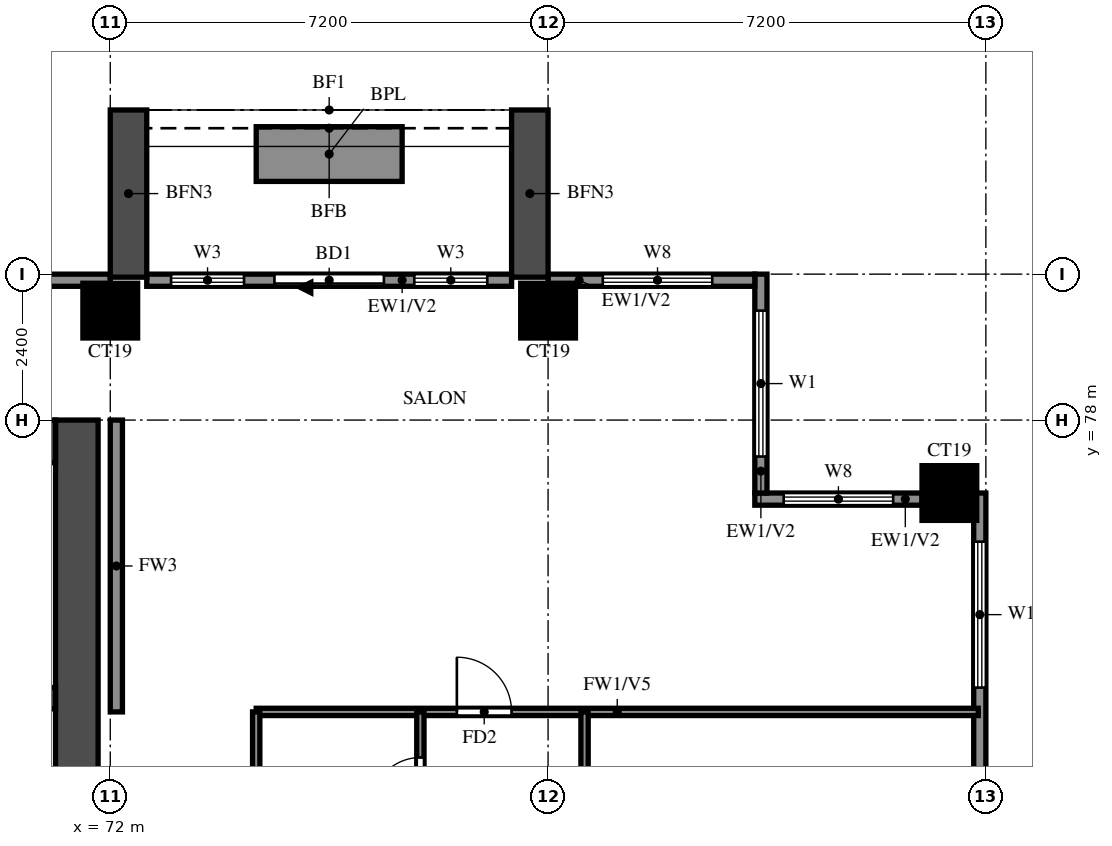
"""IFC4 building model, lengths in metres.
Left out: names, types, materials, properties, quantities, classifications, styles, units other than length and angle.
Written with IfcOpenShell. Run it as: python <this file> out.ifc"""

import sys

from ifc_helpers import new_model, si_unit, direction, frame, frame_2d, origin, origin_2d, place, context, subcontext, project, spatial, rectangle, extrude, source, transform, mapped, element, fill, save


model = new_model("IFC4")
c1 = context("Model", 3, precision=1e-05, world=origin(), true_north=direction((0.0, 1.0)))
c2 = subcontext(c1, "Body", "Model", "MODEL_VIEW")
j1 = project(units=[si_unit("LENGTHUNIT", "METRE"), si_unit("PLANEANGLEUNIT", "RADIAN")], contexts=[c1])
p1 = place(None, origin())
s1 = spatial("IfcSite", under=j1, at=p1, CompositionType="ELEMENT")
p2 = place(p1, origin())
s2 = spatial("IfcBuilding", under=s1, at=p2, CompositionType="ELEMENT")
p3 = place(p2, frame((0.0, 0.0, 116.5)))
s3 = spatial("IfcBuildingStorey", under=s2, at=p3, CompositionType="ELEMENT", Elevation=116.5)
m1 = source(origin(), c2, "Body", "SweptSolid", [
    extrude(rectangle(XDim=0.9, YDim=0.9, at=origin_2d()), origin(), (0.0, 0.0, 1.0), 3.2),
])
for number, where, z_axis, x_axis in (
    (1, (85.8, 76.8, 0.0), (0.0, 0.0, 1.0), (1.0, 0.0, 0.0)),
    (2, (72.0, 79.8, 0.0), (0.0, 0.0, 1.0), (1.0, 0.0, 0.0)),
    (3, (79.2, 79.8, 0.0), (0.0, 0.0, 1.0), (1.0, 0.0, 0.0)),
):
    element("IfcColumn", number, at=place(p3, frame(where, z_axis=z_axis, x_axis=x_axis)), inside=s3, PredefinedType="COLUMN", context=c2, shape_type="MappedRepresentation", body=[
        mapped(m1, transform((0.0, 0.0, 0.0))),
    ])
p4 = place(p3, frame((71.45, 66.1, 0.0), z_axis=(0.0, 0.0, 1.0), x_axis=(0.0, 1.0, 0.0)))
e4 = element("IfcWall", 4, at=p4, inside=s3, PredefinedType="SHEAR", context=c2, shape_type="SweptSolid", body=[
    extrude(rectangle(XDim=11.9, YDim=0.7, at=frame_2d((5.95, 0.0))), origin(), (0.0, 0.0, 1.0), 3.2),
])
p5 = place(p3, frame((29.7, 77.65, 0.0), z_axis=(0.0, 0.0, 1.0), x_axis=(1.0, 0.0, 0.0)))
e5 = element("IfcWall", 5, at=p5, inside=s3, PredefinedType="SHEAR", context=c2, shape_type="SweptSolid", body=[
    extrude(rectangle(XDim=41.4, YDim=0.7, at=frame_2d((20.7, 0.0))), origin(), (0.0, 0.0, 1.0), 3.2),
])
p6 = place(p3, frame((67.975, 73.425, 0.0), z_axis=(0.0, 0.0, 1.0), x_axis=(1.0, 0.0, 0.0)))
e6 = element("IfcWall", 6, at=p6, inside=s3, PredefinedType="SHEAR", context=c2, shape_type="SweptSolid", body=[
    extrude(rectangle(XDim=3.125, YDim=0.35, at=frame_2d((1.562, 0.0))), origin(), (0.0, 0.0, 1.0), 3.2),
])
p7 = place(p3, frame((86.3, 48.2, 0.0), z_axis=(0.0, 0.0, 1.0), x_axis=(0.0, 1.0, 0.0)))
e7 = element("IfcWall", 7, at=p7, inside=s3, PredefinedType="SOLIDWALL", context=c2, shape_type="SweptSolid", body=[
    extrude(rectangle(XDim=28.6, YDim=0.2, at=frame_2d((14.3, 0.0))), origin(), (0.0, 0.0, 1.0), 3.2),
])
p8 = place(p7, frame((0.6, 0.0, 0.6)))
e8 = element("IfcOpeningElement", 8, at=p8, cuts=e7, PredefinedType="OPENING", context=c2, shape_type="SweptSolid", body=[
    extrude(rectangle(XDim=2.4, YDim=2.4, at=frame_2d((1.2, 1.2))), frame((0.0, 0.11, 0.0), z_axis=(0.0, -1.0, 0.0), x_axis=(1.0, 0.0, 0.0)), (0.0, 0.0, 1.0), 0.22),
])
p9 = place(p7, frame((3.8, 0.0, 0.6)))
e9 = element("IfcOpeningElement", 9, at=p9, cuts=e7, PredefinedType="OPENING", context=c2, shape_type="SweptSolid", body=[
    extrude(rectangle(XDim=2.4, YDim=2.4, at=frame_2d((1.2, 1.2))), frame((0.0, 0.11, 0.0), z_axis=(0.0, -1.0, 0.0), x_axis=(1.0, 0.0, 0.0)), (0.0, 0.0, 1.0), 0.22),
])
p10 = place(p7, frame((7.8, 0.0, 0.6)))
e10 = element("IfcOpeningElement", 10, at=p10, cuts=e7, PredefinedType="OPENING", context=c2, shape_type="SweptSolid", body=[
    extrude(rectangle(XDim=2.4, YDim=2.4, at=frame_2d((1.2, 1.2))), frame((0.0, 0.11, 0.0), z_axis=(0.0, -1.0, 0.0), x_axis=(1.0, 0.0, 0.0)), (0.0, 0.0, 1.0), 0.22),
])
p11 = place(p7, frame((11.0, 0.0, 0.6)))
e11 = element("IfcOpeningElement", 11, at=p11, cuts=e7, PredefinedType="OPENING", context=c2, shape_type="SweptSolid", body=[
    extrude(rectangle(XDim=2.4, YDim=2.4, at=frame_2d((1.2, 1.2))), frame((0.0, 0.11, 0.0), z_axis=(0.0, -1.0, 0.0), x_axis=(1.0, 0.0, 0.0)), (0.0, 0.0, 1.0), 0.22),
])
p12 = place(p7, frame((15.167, 0.0, 0.6)))
e12 = element("IfcOpeningElement", 12, at=p12, cuts=e7, PredefinedType="OPENING", context=c2, shape_type="SweptSolid", body=[
    extrude(rectangle(XDim=2.4, YDim=2.4, at=frame_2d((1.2, 1.2))), frame((0.0, 0.11, 0.0), z_axis=(0.0, -1.0, 0.0), x_axis=(1.0, 0.0, 0.0)), (0.0, 0.0, 1.0), 0.22),
])
p13 = place(p7, frame((18.033, 0.0, 0.6)))
e13 = element("IfcOpeningElement", 13, at=p13, cuts=e7, PredefinedType="OPENING", context=c2, shape_type="SweptSolid", body=[
    extrude(rectangle(XDim=2.4, YDim=2.4, at=frame_2d((1.2, 1.2))), frame((0.0, 0.11, 0.0), z_axis=(0.0, -1.0, 0.0), x_axis=(1.0, 0.0, 0.0)), (0.0, 0.0, 1.0), 0.22),
])
p14 = place(p7, frame((22.95, 0.0, 1.5)))
e14 = element("IfcOpeningElement", 14, at=p14, cuts=e7, PredefinedType="OPENING", context=c2, shape_type="SweptSolid", body=[
    extrude(rectangle(XDim=0.9, YDim=0.9, at=frame_2d((0.45, 0.45))), frame((0.0, 0.11, 0.0), z_axis=(0.0, -1.0, 0.0), x_axis=(1.0, 0.0, 0.0)), (0.0, 0.0, 1.0), 0.22),
])
p15 = place(p7, frame((25.4, 0.0, 0.6)))
e15 = element("IfcOpeningElement", 15, at=p15, cuts=e7, PredefinedType="OPENING", context=c2, shape_type="SweptSolid", body=[
    extrude(rectangle(XDim=2.4, YDim=2.4, at=frame_2d((1.2, 1.2))), frame((0.0, 0.11, 0.0), z_axis=(0.0, -1.0, 0.0), x_axis=(1.0, 0.0, 0.0)), (0.0, 0.0, 1.0), 0.22),
])
p16 = place(p3, frame((85.35, 76.7, 0.0), z_axis=(0.0, 0.0, 1.0), x_axis=(-1.0, 0.0, 0.0)))
e16 = element("IfcWall", 16, at=p16, inside=s3, PredefinedType="SOLIDWALL", context=c2, shape_type="SweptSolid", body=[
    extrude(rectangle(XDim=2.75, YDim=0.2, at=frame_2d((1.375, 0.0))), origin(), (0.0, 0.0, 1.0), 3.2),
])
p17 = place(p16, frame((0.475, 0.0, 0.6)))
e17 = element("IfcOpeningElement", 17, at=p17, cuts=e16, PredefinedType="OPENING", context=c2, shape_type="SweptSolid", body=[
    extrude(rectangle(XDim=1.8, YDim=2.4, at=frame_2d((0.9, 1.2))), frame((0.0, 0.11, 0.0), z_axis=(0.0, -1.0, 0.0), x_axis=(1.0, 0.0, 0.0)), (0.0, 0.0, 1.0), 0.22),
])
p18 = place(p3, frame((82.7, 76.8, 0.0), z_axis=(0.0, 0.0, 1.0), x_axis=(0.0, 1.0, 0.0)))
e18 = element("IfcWall", 18, at=p18, inside=s3, PredefinedType="SOLIDWALL", context=c2, shape_type="SweptSolid", body=[
    extrude(rectangle(XDim=3.6, YDim=0.2, at=frame_2d((1.8, 0.0))), origin(), (0.0, 0.0, 1.0), 3.2),
])
p19 = place(p18, frame((0.6, 0.0, 0.6)))
e19 = element("IfcOpeningElement", 19, at=p19, cuts=e18, PredefinedType="OPENING", context=c2, shape_type="SweptSolid", body=[
    extrude(rectangle(XDim=2.4, YDim=2.4, at=frame_2d((1.2, 1.2))), frame((0.0, 0.11, 0.0), z_axis=(0.0, -1.0, 0.0), x_axis=(1.0, 0.0, 0.0)), (0.0, 0.0, 1.0), 0.22),
])
p20 = place(p3, frame((82.6, 80.3, 0.0), z_axis=(0.0, 0.0, 1.0), x_axis=(-1.0, 0.0, 0.0)))
e20 = element("IfcWall", 20, at=p20, inside=s3, PredefinedType="SOLIDWALL", context=c2, shape_type="SweptSolid", body=[
    extrude(rectangle(XDim=3.4, YDim=0.2, at=frame_2d((1.7, 0.0))), origin(), (0.0, 0.0, 1.0), 3.2),
])
p21 = place(p20, frame((0.7, 0.0, 0.6)))
e21 = element("IfcOpeningElement", 21, at=p21, cuts=e20, PredefinedType="OPENING", context=c2, shape_type="SweptSolid", body=[
    extrude(rectangle(XDim=1.8, YDim=2.4, at=frame_2d((0.9, 1.2))), frame((0.0, 0.11, 0.0), z_axis=(0.0, -1.0, 0.0), x_axis=(1.0, 0.0, 0.0)), (0.0, 0.0, 1.0), 0.22),
])
p22 = place(p3, frame((78.6, 80.3, 0.0), z_axis=(0.0, 0.0, 1.0), x_axis=(-1.0, 0.0, 0.0)))
e22 = element("IfcWall", 22, at=p22, inside=s3, PredefinedType="SOLIDWALL", context=c2, shape_type="SweptSolid", body=[
    extrude(rectangle(XDim=6.0, YDim=0.2, at=frame_2d((3.0, 0.0))), origin(), (0.0, 0.0, 1.0), 3.2),
])
p23 = place(p22, frame((2.1, 0.0, 0.0)))
e23 = element("IfcOpeningElement", 23, at=p23, cuts=e22, PredefinedType="OPENING", context=c2, shape_type="SweptSolid", body=[
    extrude(rectangle(XDim=1.8, YDim=2.4, at=frame_2d((0.9, 1.2))), frame((0.0, 0.11, 0.0), z_axis=(0.0, -1.0, 0.0), x_axis=(1.0, 0.0, 0.0)), (0.0, 0.0, 1.0), 0.22),
])
p24 = place(p22, frame((0.4, 0.0, 0.6)))
e24 = element("IfcOpeningElement", 24, at=p24, cuts=e22, PredefinedType="OPENING", context=c2, shape_type="SweptSolid", body=[
    extrude(rectangle(XDim=1.2, YDim=2.4, at=frame_2d((0.6, 1.2))), frame((0.0, 0.11, 0.0), z_axis=(0.0, -1.0, 0.0), x_axis=(1.0, 0.0, 0.0)), (0.0, 0.0, 1.0), 0.22),
])
p25 = place(p22, frame((4.4, 0.0, 0.6)))
e25 = element("IfcOpeningElement", 25, at=p25, cuts=e22, PredefinedType="OPENING", context=c2, shape_type="SweptSolid", body=[
    extrude(rectangle(XDim=1.2, YDim=2.4, at=frame_2d((0.6, 1.2))), frame((0.0, 0.11, 0.0), z_axis=(0.0, -1.0, 0.0), x_axis=(1.0, 0.0, 0.0)), (0.0, 0.0, 1.0), 0.22),
])
p26 = place(p3, frame((72.0, 80.3, 0.0), z_axis=(0.0, 0.0, 1.0), x_axis=(-1.0, 0.0, 0.0)))
e26 = element("IfcWall", 26, at=p26, inside=s3, PredefinedType="SOLIDWALL", context=c2, shape_type="SweptSolid", body=[
    extrude(rectangle(XDim=54.0, YDim=0.2, at=frame_2d((27.0, 0.0))), origin(), (0.0, 0.0, 1.0), 3.2),
])
p27 = place(p26, frame((44.167, 0.0, 0.6)))
e27 = element("IfcOpeningElement", 27, at=p27, cuts=e26, PredefinedType="OPENING", context=c2, shape_type="SweptSolid", body=[
    extrude(rectangle(XDim=2.4, YDim=2.4, at=frame_2d((1.2, 1.2))), frame((0.0, 0.11, 0.0), z_axis=(0.0, -1.0, 0.0), x_axis=(1.0, 0.0, 0.0)), (0.0, 0.0, 1.0), 0.22),
])
p28 = place(p26, frame((47.033, 0.0, 0.6)))
e28 = element("IfcOpeningElement", 28, at=p28, cuts=e26, PredefinedType="OPENING", context=c2, shape_type="SweptSolid", body=[
    extrude(rectangle(XDim=2.4, YDim=2.4, at=frame_2d((1.2, 1.2))), frame((0.0, 0.11, 0.0), z_axis=(0.0, -1.0, 0.0), x_axis=(1.0, 0.0, 0.0)), (0.0, 0.0, 1.0), 0.22),
])
p29 = place(p26, frame((51.4, 0.0, 0.6)))
e29 = element("IfcOpeningElement", 29, at=p29, cuts=e26, PredefinedType="OPENING", context=c2, shape_type="SweptSolid", body=[
    extrude(rectangle(XDim=1.8, YDim=2.4, at=frame_2d((0.9, 1.2))), frame((0.0, 0.11, 0.0), z_axis=(0.0, -1.0, 0.0), x_axis=(1.0, 0.0, 0.0)), (0.0, 0.0, 1.0), 0.22),
])
for number, where, z_axis, x_axis in (
    (30, (78.9, 80.35, 0.0), (0.0, 0.0, 1.0), (0.0, 1.0, 0.0)),
    (31, (72.3, 80.35, 0.0), (0.0, 0.0, 1.0), (0.0, 1.0, 0.0)),
):
    element("IfcWall", number, at=place(p3, frame(where, z_axis=z_axis, x_axis=x_axis)), inside=s3, PredefinedType="SOLIDWALL", context=c2, shape_type="SweptSolid", body=[
        extrude(rectangle(XDim=2.75, YDim=0.6, at=frame_2d((1.375, 0.0))), origin(), (0.0, 0.0, 1.0), 2.85),
    ])
p30 = place(p3, frame((76.8, 82.375, 0.0), z_axis=(0.0, 0.0, 1.0), x_axis=(-1.0, 0.0, 0.0)))
e32 = element("IfcWall", 32, at=p30, inside=s3, PredefinedType="SOLIDWALL", context=c2, shape_type="SweptSolid", body=[
    extrude(rectangle(XDim=2.4, YDim=0.9, at=frame_2d((1.2, 0.0))), origin(), (0.0, 0.0, 1.0), 0.9),
])
p31 = place(p3, frame((72.1, 73.2, 0.0), z_axis=(0.0, 0.0, 1.0), x_axis=(0.0, 1.0, 0.0)))
e33 = element("IfcWall", 33, at=p31, inside=s3, PredefinedType="SOLIDWALL", context=c2, shape_type="SweptSolid", body=[
    extrude(rectangle(XDim=4.8, YDim=0.2, at=frame_2d((2.4, 0.0))), origin(), (0.0, 0.0, 1.0), 3.2),
])
p32 = place(p3, frame((74.4, 73.2, 0.0), z_axis=(0.0, 0.0, 1.0), x_axis=(1.0, 0.0, 0.0)))
e34 = element("IfcWall", 34, at=p32, inside=s3, PredefinedType="PARTITIONING", context=c2, shape_type="SweptSolid", body=[
    extrude(rectangle(XDim=11.875, YDim=0.12, at=frame_2d((5.938, 0.0))), origin(), (0.0, 0.0, 1.0), 2.3),
])
p33 = place(p32, frame((3.3, 0.0, 0.0)))
e35 = element("IfcOpeningElement", 35, at=p33, cuts=e34, PredefinedType="OPENING", context=c2, shape_type="SweptSolid", body=[
    extrude(rectangle(XDim=0.9, YDim=2.1, at=frame_2d((0.45, 1.05))), frame((0.0, 0.07, 0.0), z_axis=(0.0, -1.0, 0.0), x_axis=(1.0, 0.0, 0.0)), (0.0, 0.0, 1.0), 0.14),
])
p34 = place(p3, frame((74.4, 70.9, 0.0), z_axis=(0.0, 0.0, 1.0), x_axis=(0.0, 1.0, 0.0)))
e36 = element("IfcWall", 36, at=p34, inside=s3, PredefinedType="PARTITIONING", context=c2, shape_type="SweptSolid", body=[
    extrude(rectangle(XDim=2.3, YDim=0.12, at=frame_2d((1.15, 0.0))), origin(), (0.0, 0.0, 1.0), 3.2),
])
p35 = place(p3, frame((77.1, 61.2, 0.0), z_axis=(0.0, 0.0, 1.0), x_axis=(0.0, 1.0, 0.0)))
e37 = element("IfcWall", 37, at=p35, inside=s3, PredefinedType="PARTITIONING", context=c2, shape_type="SweptSolid", body=[
    extrude(rectangle(XDim=12.0, YDim=0.12, at=frame_2d((6.0, 0.0))), origin(), (0.0, 0.0, 1.0), 3.2),
])
p36 = place(p35, frame((4.2, 0.0, 0.0)))
e38 = element("IfcOpeningElement", 38, at=p36, cuts=e37, PredefinedType="OPENING", context=c2, shape_type="SweptSolid", body=[
    extrude(rectangle(XDim=0.9, YDim=2.1, at=frame_2d((0.45, 1.05))), frame((0.0, 0.07, 0.0), z_axis=(0.0, -1.0, 0.0), x_axis=(1.0, 0.0, 0.0)), (0.0, 0.0, 1.0), 0.14),
])
p37 = place(p35, frame((7.975, 0.0, 0.0)))
e39 = element("IfcOpeningElement", 39, at=p37, cuts=e37, PredefinedType="OPENING", context=c2, shape_type="SweptSolid", body=[
    extrude(rectangle(XDim=0.8, YDim=2.1, at=frame_2d((0.4, 1.05))), frame((0.0, 0.07, 0.0), z_axis=(0.0, -1.0, 0.0), x_axis=(1.0, 0.0, 0.0)), (0.0, 0.0, 1.0), 0.14),
])
p38 = place(p35, frame((10.45, 0.0, 0.0)))
e40 = element("IfcOpeningElement", 40, at=p38, cuts=e37, PredefinedType="OPENING", context=c2, shape_type="SweptSolid", body=[
    extrude(rectangle(XDim=0.8, YDim=2.1, at=frame_2d((0.4, 1.05))), frame((0.0, 0.07, 0.0), z_axis=(0.0, -1.0, 0.0), x_axis=(1.0, 0.0, 0.0)), (0.0, 0.0, 1.0), 0.14),
])
p39 = place(p3, frame((79.8, 69.6, 0.0), z_axis=(0.0, 0.0, 1.0), x_axis=(0.0, 1.0, 0.0)))
e41 = element("IfcWall", 41, at=p39, inside=s3, PredefinedType="PARTITIONING", context=c2, shape_type="SweptSolid", body=[
    extrude(rectangle(XDim=3.6, YDim=0.12, at=frame_2d((1.8, 0.0))), origin(), (0.0, 0.0, 1.0), 3.2),
])
p40 = place(p15, origin())
e42 = element("IfcWindow", 42, at=p40, inside=s3, PartitioningType="DOUBLE_PANEL_VERTICAL", PredefinedType="WINDOW", context=c2, shape_type="SweptSolid", body=[
    extrude(rectangle(XDim=2.4, YDim=2.4, at=frame_2d((1.2, 1.2))), frame((0.0, 0.03, 0.0), z_axis=(0.0, -1.0, 0.0), x_axis=(1.0, 0.0, 0.0)), (0.0, 0.0, 1.0), 0.06),
])
fill(e15, e42)
p41 = place(p17, origin())
e43 = element("IfcWindow", 43, at=p41, inside=s3, PartitioningType="DOUBLE_PANEL_VERTICAL", PredefinedType="WINDOW", context=c2, shape_type="SweptSolid", body=[
    extrude(rectangle(XDim=1.8, YDim=2.4, at=frame_2d((0.9, 1.2))), frame((0.0, 0.03, 0.0), z_axis=(0.0, -1.0, 0.0), x_axis=(1.0, 0.0, 0.0)), (0.0, 0.0, 1.0), 0.06),
])
fill(e17, e43)
p42 = place(p19, origin())
e44 = element("IfcWindow", 44, at=p42, inside=s3, PartitioningType="DOUBLE_PANEL_VERTICAL", PredefinedType="WINDOW", context=c2, shape_type="SweptSolid", body=[
    extrude(rectangle(XDim=2.4, YDim=2.4, at=frame_2d((1.2, 1.2))), frame((0.0, 0.03, 0.0), z_axis=(0.0, -1.0, 0.0), x_axis=(1.0, 0.0, 0.0)), (0.0, 0.0, 1.0), 0.06),
])
fill(e19, e44)
p43 = place(p21, origin())
e45 = element("IfcWindow", 45, at=p43, inside=s3, PartitioningType="DOUBLE_PANEL_VERTICAL", PredefinedType="WINDOW", context=c2, shape_type="SweptSolid", body=[
    extrude(rectangle(XDim=1.8, YDim=2.4, at=frame_2d((0.9, 1.2))), frame((0.0, 0.03, 0.0), z_axis=(0.0, -1.0, 0.0), x_axis=(1.0, 0.0, 0.0)), (0.0, 0.0, 1.0), 0.06),
])
fill(e21, e45)
p44 = place(p23, origin())
e46 = element("IfcDoor", 46, at=p44, inside=s3, OperationType="DOUBLE_DOOR_SLIDING", PredefinedType="DOOR", context=c2, shape_type="SweptSolid", body=[
    extrude(rectangle(XDim=1.8, YDim=2.4, at=frame_2d((0.9, 1.2))), frame((0.0, 0.025, 0.0), z_axis=(0.0, -1.0, 0.0), x_axis=(1.0, 0.0, 0.0)), (0.0, 0.0, 1.0), 0.05),
])
fill(e23, e46)
p45 = place(p24, origin())
e47 = element("IfcWindow", 47, at=p45, inside=s3, PartitioningType="SINGLE_PANEL", PredefinedType="WINDOW", context=c2, shape_type="SweptSolid", body=[
    extrude(rectangle(XDim=1.2, YDim=2.4, at=frame_2d((0.6, 1.2))), frame((0.0, 0.03, 0.0), z_axis=(0.0, -1.0, 0.0), x_axis=(1.0, 0.0, 0.0)), (0.0, 0.0, 1.0), 0.06),
])
fill(e24, e47)
p46 = place(p25, origin())
e48 = element("IfcWindow", 48, at=p46, inside=s3, PartitioningType="SINGLE_PANEL", PredefinedType="WINDOW", context=c2, shape_type="SweptSolid", body=[
    extrude(rectangle(XDim=1.2, YDim=2.4, at=frame_2d((0.6, 1.2))), frame((0.0, 0.03, 0.0), z_axis=(0.0, -1.0, 0.0), x_axis=(1.0, 0.0, 0.0)), (0.0, 0.0, 1.0), 0.06),
])
fill(e25, e48)
p47 = place(p33, origin())
e49 = element("IfcDoor", 49, at=p47, inside=s3, OperationType="SINGLE_SWING_LEFT", PredefinedType="DOOR", context=c2, shape_type="SweptSolid", body=[
    extrude(rectangle(XDim=0.9, YDim=2.1, at=frame_2d((0.45, 1.05))), frame((0.0, 0.025, 0.0), z_axis=(0.0, -1.0, 0.0), x_axis=(1.0, 0.0, 0.0)), (0.0, 0.0, 1.0), 0.05),
])
fill(e35, e49)
p48 = place(p38, origin())
e50 = element("IfcDoor", 50, at=p48, inside=s3, OperationType="SINGLE_SWING_RIGHT", PredefinedType="DOOR", context=c2, shape_type="SweptSolid", body=[
    extrude(rectangle(XDim=0.8, YDim=2.1, at=frame_2d((0.4, 1.05))), frame((0.0, 0.025, 0.0), z_axis=(0.0, -1.0, 0.0), x_axis=(1.0, 0.0, 0.0)), (0.0, 0.0, 1.0), 0.05),
])
fill(e40, e50)
save(model, sys.argv[1])
